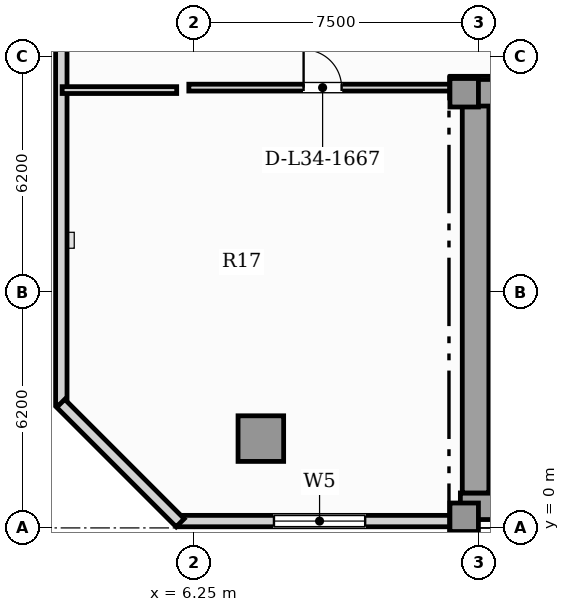
"""IFC4 building model, lengths in metres.
Left out: names, types, materials, properties, quantities, classifications, styles, units other than length and angle.
Written with IfcOpenShell. Run it as: python <this file> out.ifc"""

import sys

from ifc_helpers import new_model, si_unit, direction, frame, frame_2d, origin, origin_2d, place, context, subcontext, project, spatial, rectangle, hollow_rectangle, extrude, element, fill, save


model = new_model("IFC4")
c1 = context("Model", 3, precision=1e-05, world=origin(), true_north=direction((0.0, 1.0)))
c2 = subcontext(c1, "Body", "Model", "MODEL_VIEW")
j1 = project(units=[si_unit("LENGTHUNIT", "METRE"), si_unit("PLANEANGLEUNIT", "RADIAN")], contexts=[c1])
p1 = place(None, origin())
s1 = spatial("IfcSite", under=j1, at=p1, CompositionType="ELEMENT")
p2 = place(p1, origin())
s2 = spatial("IfcBuilding", under=s1, at=p2, CompositionType="ELEMENT")
p3 = place(p2, frame((0.0, 0.0, 140.15)))
s3 = spatial("IfcBuildingStorey", under=s2, at=p3, CompositionType="ELEMENT", Elevation=140.15)
p4 = place(p3, frame((13.25, 0.57, 0.0), z_axis=(0.0, 0.0, 1.0), x_axis=(1.0, 0.0, 0.0)))
e1 = element("IfcWall", 1, at=p4, inside=s3, PredefinedType="SHEAR", context=c2, shape_type="SweptSolid", body=[
    extrude(rectangle(XDim=31.0, YDim=0.7, at=frame_2d((15.5, 0.0))), origin(), (0.0, 0.0, 1.0), 4.83),
])
p5 = place(p3, frame((13.65, 0.92, 0.0), z_axis=(0.0, 0.0, 1.0), x_axis=(0.0, 1.0, 0.0)))
e2 = element("IfcWall", 2, at=p5, inside=s3, PredefinedType="SHEAR", context=c2, shape_type="SweptSolid", body=[
    extrude(rectangle(XDim=10.53, YDim=0.7, at=frame_2d((5.265, 0.0))), origin(), (0.0, 0.0, 1.0), 4.83),
])
p6 = place(p3, frame((13.25, 11.45, 0.0), z_axis=(0.0, 0.0, 1.0), x_axis=(1.0, 0.0, 0.0)))
e3 = element("IfcWall", 3, at=p6, inside=s3, PredefinedType="SHEAR", context=c2, shape_type="SweptSolid", body=[
    extrude(rectangle(XDim=2.95, YDim=0.7, at=frame_2d((1.475, 0.0))), origin(), (0.0, 0.0, 1.0), 4.83),
])
for number, where, z_axis, x_axis in (
    (4, (13.35, 0.28, 0.0), (0.0, 0.0, 1.0), (1.0, 0.0, 0.0)),
    (5, (13.35, 11.45, 0.0), (0.0, 0.0, 1.0), (1.0, 0.0, 0.0)),
):
    element("IfcColumn", number, at=place(p3, frame(where, z_axis=z_axis, x_axis=x_axis)), inside=s3, PredefinedType="COLUMN", context=c2, shape_type="SweptSolid", body=[
        extrude(rectangle(XDim=0.75, YDim=0.75, at=origin_2d()), origin(), (0.0, 0.0, 1.0), 5.05),
    ])
p7 = place(p3, frame((8.0, 2.35, 0.0), z_axis=(0.0, 0.0, 1.0), x_axis=(1.0, 0.0, 0.0)))
e6 = element("IfcColumn", 6, at=p7, inside=s3, PredefinedType="USERDEFINED", context=c2, shape_type="SweptSolid", body=[
    extrude(hollow_rectangle(XDim=1.2, YDim=1.2, WallThickness=0.07, at=origin_2d()), origin(), (0.0, 0.0, 1.0), 5.05),
])
p8 = place(p3, frame((5.84, 0.18, 0.0), z_axis=(0.0, 0.0, 1.0), x_axis=(1.0, 0.0, 0.0)))
e7 = element("IfcWall", 7, at=p8, inside=s3, PredefinedType="SOLIDWALL", context=c2, shape_type="SweptSolid", body=[
    extrude(rectangle(XDim=7.41, YDim=0.3, at=frame_2d((3.705, 0.0))), origin(), (0.0, 0.0, 1.0), 4.83),
])
p9 = place(p8, frame((2.505, 0.0, 0.85)))
e8 = element("IfcOpeningElement", 8, at=p9, cuts=e7, PredefinedType="OPENING", context=c2, shape_type="SweptSolid", body=[
    extrude(rectangle(XDim=2.4, YDim=2.0, at=frame_2d((1.2, 1.0))), frame((0.0, 0.16, 0.0), z_axis=(0.0, -1.0, 0.0), x_axis=(1.0, 0.0, 0.0)), (0.0, 0.0, 1.0), 0.32),
])
p10 = place(p3, frame((2.75, 39.96, 0.0), z_axis=(0.0, 0.0, 1.0), x_axis=(0.0, -1.0, 0.0)))
e9 = element("IfcWall", 9, at=p10, inside=s3, PredefinedType="SOLIDWALL", context=c2, shape_type="SweptSolid", body=[
    extrude(rectangle(XDim=36.72, YDim=0.3, at=frame_2d((18.36, 0.0))), origin(), (0.0, 0.0, 1.0), 4.83),
])
p11 = place(p10, frame((5.26, 0.0, 0.95)))
e10 = element("IfcOpeningElement", 10, at=p11, cuts=e9, PredefinedType="OPENING", context=c2, shape_type="SweptSolid", body=[
    extrude(rectangle(XDim=0.9, YDim=1.5, at=frame_2d((0.45, 0.75))), frame((0.0, 0.16, 0.0), z_axis=(0.0, -1.0, 0.0), x_axis=(1.0, 0.0, 0.0)), (0.0, 0.0, 1.0), 0.32),
])
p12 = place(p10, frame((21.287, 0.0, 0.9)))
e11 = element("IfcOpeningElement", 11, at=p12, cuts=e9, PredefinedType="OPENING", context=c2, shape_type="SweptSolid", body=[
    extrude(rectangle(XDim=1.5, YDim=1.95, at=frame_2d((0.75, 0.975))), frame((0.0, 0.16, 0.0), z_axis=(0.0, -1.0, 0.0), x_axis=(1.0, 0.0, 0.0)), (0.0, 0.0, 1.0), 0.32),
])
p13 = place(p10, frame((11.887, 0.0, 0.9)))
e12 = element("IfcOpeningElement", 12, at=p13, cuts=e9, PredefinedType="OPENING", context=c2, shape_type="SweptSolid", body=[
    extrude(rectangle(XDim=1.5, YDim=1.95, at=frame_2d((0.75, 0.975))), frame((0.0, 0.16, 0.0), z_axis=(0.0, -1.0, 0.0), x_axis=(1.0, 0.0, 0.0)), (0.0, 0.0, 1.0), 0.32),
])
p14 = place(p3, frame((2.734, 3.278, 0.0), z_axis=(0.0, 0.0, 1.0), x_axis=(0.707106781187, -0.707106781187, 0.0)))
e13 = element("IfcWall", 13, at=p14, inside=s3, PredefinedType="SOLIDWALL", context=c2, shape_type="SweptSolid", body=[
    extrude(rectangle(XDim=4.445, YDim=0.3, at=frame_2d((2.223, 0.0))), origin(), (0.0, 0.0, 1.0), 4.83),
])
p15 = place(p3, frame((14.04, 8.52, 0.0), z_axis=(0.0, 0.0, 1.0), x_axis=(1.0, 0.0, 0.0)))
e14 = element("IfcWall", 14, at=p15, inside=s3, PredefinedType="SOLIDWALL", context=c2, shape_type="SweptSolid", body=[
    extrude(rectangle(XDim=3.4, YDim=0.22, at=frame_2d((1.7, 0.0))), origin(), (0.0, 0.0, 1.0), 4.83),
])
p16 = place(p15, frame((1.125, 0.0, 0.0)))
e15 = element("IfcOpeningElement", 15, at=p16, cuts=e14, PredefinedType="OPENING", context=c2, shape_type="SweptSolid", body=[
    extrude(rectangle(XDim=1.15, YDim=2.2, at=frame_2d((0.575, 1.1))), frame((0.0, 0.12, 0.0), z_axis=(0.0, -1.0, 0.0), x_axis=(1.0, 0.0, 0.0)), (0.0, 0.0, 1.0), 0.24),
])
p17 = place(p3, frame((6.105, 11.585, 0.0), z_axis=(0.0, 0.0, 1.0), x_axis=(1.0, 0.0, 0.0)))
e16 = element("IfcWall", 16, at=p17, inside=s3, PredefinedType="PARTITIONING", context=c2, shape_type="SweptSolid", body=[
    extrude(rectangle(XDim=7.04, YDim=0.18, at=frame_2d((3.52, 0.0))), origin(), (0.0, 0.0, 1.0), 4.83),
])
p18 = place(p17, frame((3.02, 0.0, 0.0)))
e17 = element("IfcOpeningElement", 17, at=p18, cuts=e16, PredefinedType="OPENING", context=c2, shape_type="SweptSolid", body=[
    extrude(rectangle(XDim=1.0, YDim=2.15, at=frame_2d((0.5, 1.075))), frame((0.0, 0.1, 0.0), z_axis=(0.0, -1.0, 0.0), x_axis=(1.0, 0.0, 0.0)), (0.0, 0.0, 1.0), 0.2),
])
p19 = place(p3, frame((2.772, 11.52, 0.0), z_axis=(0.0, 0.0, 1.0), x_axis=(1.0, 0.0, 0.0)))
e18 = element("IfcWall", 18, at=p19, inside=s3, PredefinedType="PARTITIONING", context=c2, shape_type="SweptSolid", body=[
    extrude(rectangle(XDim=3.013, YDim=0.18, at=frame_2d((1.507, 0.0))), origin(), (0.0, 0.0, 1.0), 4.83),
])
p20 = place(p9, origin())
e19 = element("IfcWindow", 19, at=p20, inside=s3, PartitioningType="SINGLE_PANEL", PredefinedType="WINDOW", context=c2, shape_type="SweptSolid", body=[
    extrude(rectangle(XDim=2.4, YDim=2.0, at=frame_2d((1.2, 1.0))), frame((0.0, 0.03, 0.0), z_axis=(0.0, -1.0, 0.0), x_axis=(1.0, 0.0, 0.0)), (0.0, 0.0, 1.0), 0.06),
])
fill(e8, e19)
p21 = place(p18, origin())
e20 = element("IfcDoor", 20, at=p21, inside=s3, OperationType="SINGLE_SWING_LEFT", PredefinedType="DOOR", context=c2, shape_type="SweptSolid", body=[
    extrude(rectangle(XDim=1.0, YDim=2.15, at=frame_2d((0.5, 1.075))), frame((0.0, 0.025, 0.0), z_axis=(0.0, -1.0, 0.0), x_axis=(1.0, 0.0, 0.0)), (0.0, 0.0, 1.0), 0.05),
])
fill(e17, e20)
save(model, sys.argv[1])
